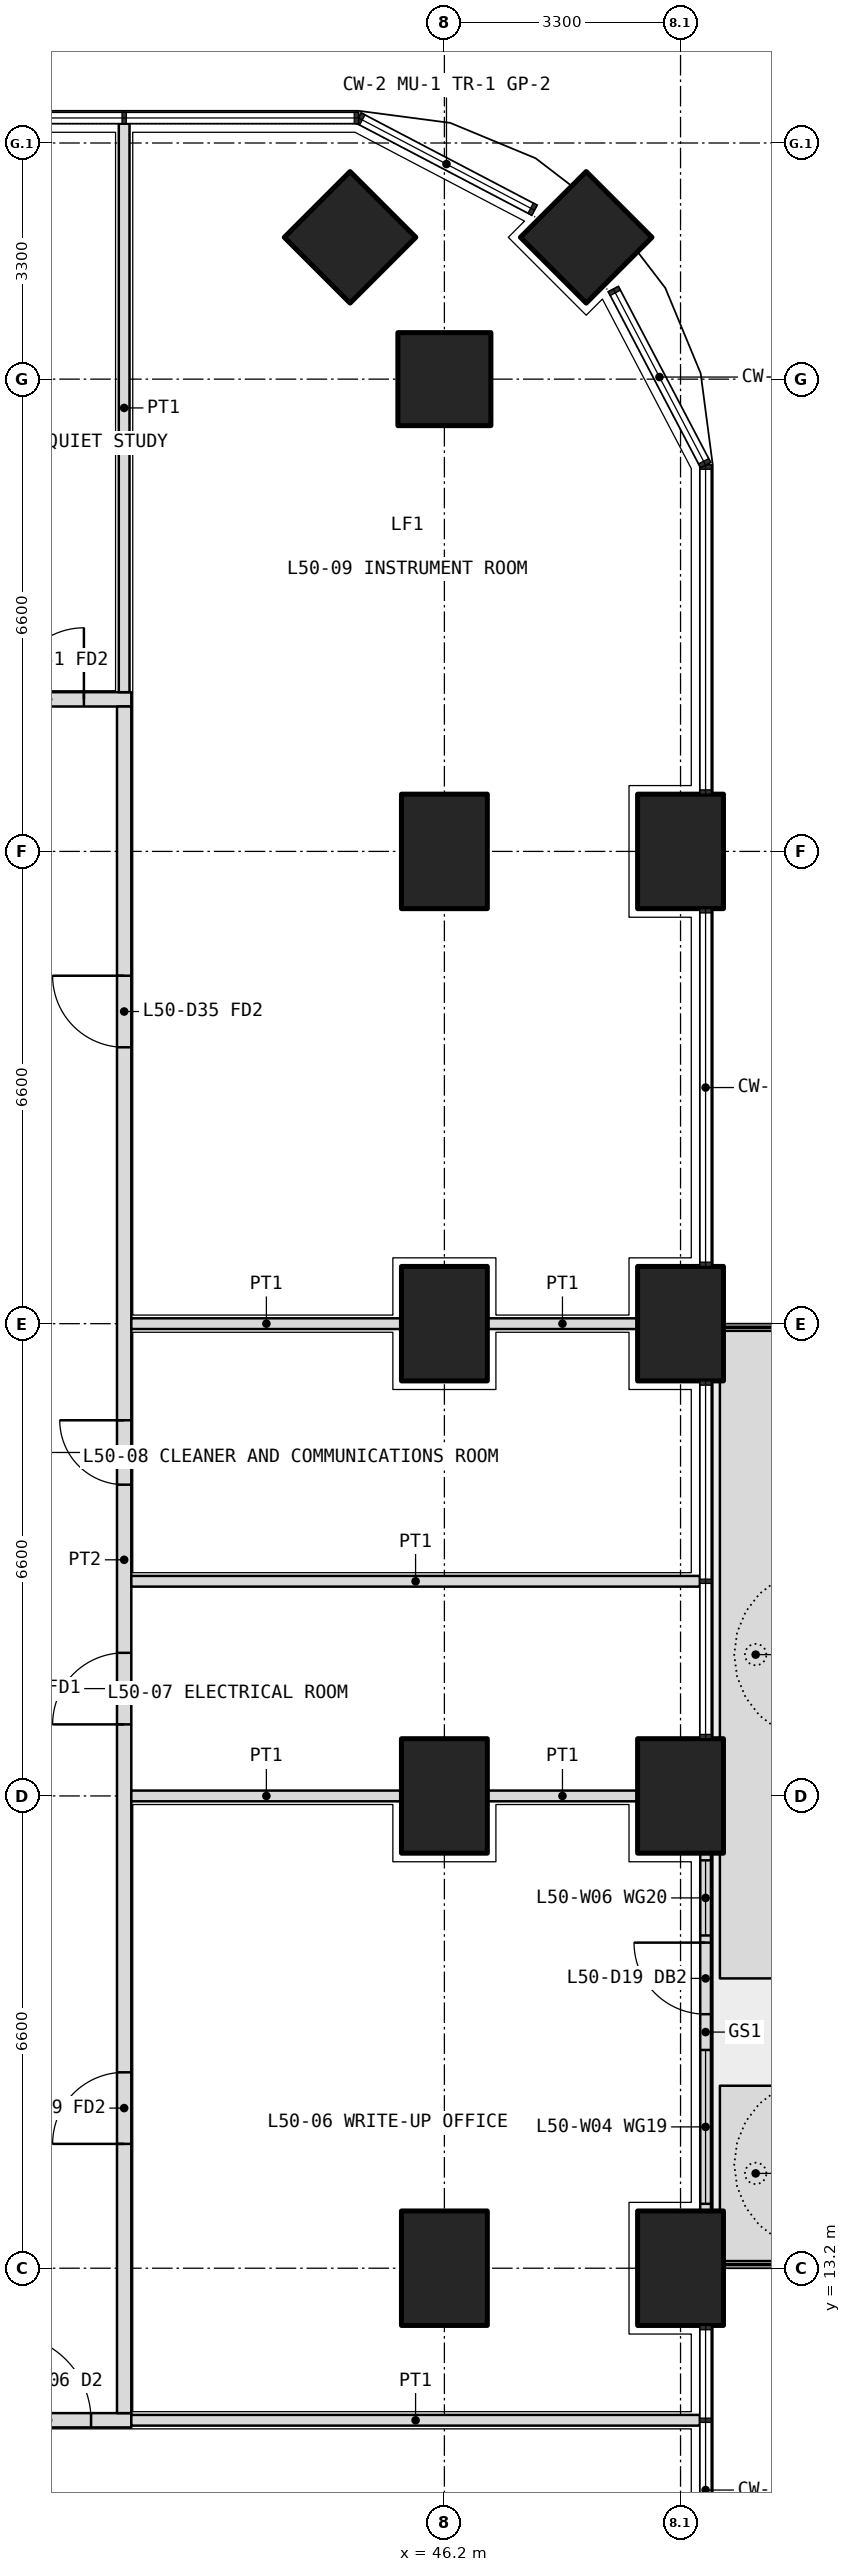
"""IFC4 building model, lengths in metres.
Left out: names, types, materials, properties, quantities, classifications, styles, units other than length and angle.
Written with IfcOpenShell. Run it as: python <this file> out.ifc"""

import sys

from ifc_helpers import new_model, si_unit, direction, frame, frame_2d, origin, origin_2d, place, context, subcontext, project, spatial, polyline, rectangle, outline, extrude, element, fill, save


model = new_model("IFC4")
c1 = context("Model", 3, precision=1e-05, world=origin(), true_north=direction((0.0, 1.0)))
c2 = subcontext(c1, "Body", "Model", "MODEL_VIEW")
j1 = project(units=[si_unit("LENGTHUNIT", "METRE"), si_unit("PLANEANGLEUNIT", "RADIAN")], contexts=[c1])
p1 = place(None, origin())
s1 = spatial("IfcSite", under=j1, at=p1, CompositionType="ELEMENT")
p2 = place(p1, origin())
s2 = spatial("IfcBuilding", under=s1, at=p2, CompositionType="ELEMENT")
p3 = place(p2, frame((0.0, 0.0, 218.7)))
s3 = spatial("IfcBuildingStorey", under=s2, at=p3, CompositionType="ELEMENT", Elevation=218.7)
p4 = place(p3, frame((48.182, 41.582, 0.0), z_axis=(0.0, 0.0, 1.0), x_axis=(0.707106781187, 0.707106781187, 0.0)))
e1 = element("IfcColumn", 1, at=p4, inside=s3, PredefinedType="COLUMN", context=c2, shape_type="SweptSolid", body=[
    extrude(rectangle(XDim=1.3, YDim=1.3, at=origin_2d()), origin(), (0.0, 0.0, 1.0), 4.2),
])
for number, where, z_axis, x_axis in (
    (2, (49.5, 13.2, 0.0), (0.0, 0.0, 1.0), (0.0, 1.0, 0.0)),
    (3, (49.5, 19.8, 0.0), (0.0, 0.0, 1.0), (0.0, 1.0, 0.0)),
    (4, (49.5, 26.4, 0.0), (0.0, 0.0, 1.0), (0.0, 1.0, 0.0)),
    (5, (49.5, 33.0, 0.0), (0.0, 0.0, 1.0), (0.0, 1.0, 0.0)),
):
    element("IfcColumn", number, at=place(p3, frame(where, z_axis=z_axis, x_axis=x_axis)), inside=s3, PredefinedType="COLUMN", context=c2, shape_type="SweptSolid", body=[
        extrude(rectangle(XDim=1.6, YDim=1.2, at=origin_2d()), origin(), (0.0, 0.0, 1.0), 4.2),
    ])
for number, where, z_axis, x_axis in (
    (6, (46.2, 39.6, 0.0), (0.0, 0.0, 1.0), (1.0, 0.0, 0.0)),
    (7, (44.882, 41.582, 0.0), (0.0, 0.0, 1.0), (0.707, 0.707, 0.0)),
):
    element("IfcColumn", number, at=place(p3, frame(where, z_axis=z_axis, x_axis=x_axis)), inside=s3, PredefinedType="COLUMN", context=c2, shape_type="SweptSolid", body=[
        extrude(rectangle(XDim=1.3, YDim=1.3, at=origin_2d()), origin(), (0.0, 0.0, 1.0), 4.2),
    ])
for number, where, z_axis, x_axis in (
    (8, (46.2, 13.2, 0.0), (0.0, 0.0, 1.0), (0.0, 1.0, 0.0)),
    (9, (46.2, 19.8, 0.0), (0.0, 0.0, 1.0), (0.0, 1.0, 0.0)),
    (10, (46.2, 26.4, 0.0), (0.0, 0.0, 1.0), (0.0, 1.0, 0.0)),
    (11, (46.2, 33.0, 0.0), (0.0, 0.0, 1.0), (0.0, 1.0, 0.0)),
):
    element("IfcColumn", number, at=place(p3, frame(where, z_axis=z_axis, x_axis=x_axis)), inside=s3, PredefinedType="COLUMN", context=c2, shape_type="SweptSolid", body=[
        extrude(rectangle(XDim=1.6, YDim=1.2, at=origin_2d()), origin(), (0.0, 0.0, 1.0), 4.2),
    ])
p5 = place(p3, origin())
e12 = element("IfcWall", 12, at=p5, inside=s3, PredefinedType="USERDEFINED", context=c2, shape_type="SweptSolid", body=[
    extrude(outline(polyline([(50.05, 13.3), (51.05, 13.3), (51.05, 15.75), (50.05, 15.75), (50.05, 13.3)]), holes=[polyline([(50.2, 13.45), (50.9, 13.45), (50.9, 15.6), (50.2, 15.6), (50.2, 13.45)])]), origin(), (0.0, 0.0, 1.0), 1.05),
])
p6 = place(p3, origin())
e13 = element("IfcWall", 13, at=p6, inside=s3, PredefinedType="USERDEFINED", context=c2, shape_type="SweptSolid", body=[
    extrude(outline(polyline([(50.05, 17.25), (51.05, 17.25), (51.05, 26.3), (50.05, 26.3), (50.05, 17.25)]), holes=[polyline([(50.2, 17.4), (50.9, 17.4), (50.9, 26.15), (50.2, 26.15), (50.2, 17.4)])]), origin(), (0.0, 0.0, 1.0), 1.05),
])
p7 = place(p3, frame((49.85, 14.0, 0.0), z_axis=(0.0, 0.0, 1.0), x_axis=(0.0, 1.0, 0.0)))
e14 = element("IfcWall", 14, at=p7, inside=s3, PredefinedType="SOLIDWALL", context=c2, shape_type="SweptSolid", body=[
    extrude(rectangle(XDim=5.0, YDim=0.15, at=frame_2d((2.5, 0.0))), origin(), (0.0, 0.0, 1.0), 2.05),
])
p8 = place(p7, frame((2.75, 0.0, 0.0)))
e15 = element("IfcOpeningElement", 15, at=p8, cuts=e14, PredefinedType="OPENING", context=c2, shape_type="SweptSolid", body=[
    extrude(rectangle(XDim=1.0, YDim=2.0, at=frame_2d((0.5, 1.0))), frame((0.0, 0.085, 0.0), z_axis=(0.0, -1.0, 0.0), x_axis=(1.0, 0.0, 0.0)), (0.0, 0.0, 1.0), 0.17),
])
p9 = place(p7, frame((0.1, 0.0, 0.1)))
e16 = element("IfcOpeningElement", 16, at=p9, cuts=e14, PredefinedType="OPENING", context=c2, shape_type="SweptSolid", body=[
    extrude(rectangle(XDim=2.15, YDim=1.65, at=frame_2d((1.075, 0.825))), frame((0.0, 0.085, 0.0), z_axis=(0.0, -1.0, 0.0), x_axis=(1.0, 0.0, 0.0)), (0.0, 0.0, 1.0), 0.17),
])
p10 = place(p7, frame((3.85, 0.0, 0.1)))
e17 = element("IfcOpeningElement", 17, at=p10, cuts=e14, PredefinedType="OPENING", context=c2, shape_type="SweptSolid", body=[
    extrude(rectangle(XDim=1.05, YDim=1.65, at=frame_2d((0.525, 0.825))), frame((0.0, 0.085, 0.0), z_axis=(0.0, -1.0, 0.0), x_axis=(1.0, 0.0, 0.0)), (0.0, 0.0, 1.0), 0.17),
])
p11 = place(p3, frame((26.4, 11.075, 0.0), z_axis=(0.0, 0.0, 1.0), x_axis=(1.0, 0.0, 0.0)))
e18 = element("IfcWall", 18, at=p11, inside=s3, PredefinedType="PARTITIONING", context=c2, shape_type="SweptSolid", body=[
    extrude(rectangle(XDim=15.425, YDim=0.2, at=frame_2d((7.712, 0.0))), origin(), (0.0, 0.0, 1.0), 2.55),
])
p12 = place(p11, frame((6.1, 0.0, 0.0)))
e19 = element("IfcOpeningElement", 19, at=p12, cuts=e18, PredefinedType="OPENING", context=c2, shape_type="SweptSolid", body=[
    extrude(rectangle(XDim=1.0, YDim=2.1, at=frame_2d((0.5, 1.05))), frame((0.0, 0.11, 0.0), z_axis=(0.0, -1.0, 0.0), x_axis=(1.0, 0.0, 0.0)), (0.0, 0.0, 1.0), 0.22),
])
p13 = place(p11, frame((13.663, 0.0, 0.0)))
e20 = element("IfcOpeningElement", 20, at=p13, cuts=e18, PredefinedType="OPENING", context=c2, shape_type="SweptSolid", body=[
    extrude(rectangle(XDim=1.2, YDim=2.1, at=frame_2d((0.6, 1.05))), frame((0.0, 0.11, 0.0), z_axis=(0.0, -1.0, 0.0), x_axis=(1.0, 0.0, 0.0)), (0.0, 0.0, 1.0), 0.22),
])
p14 = place(p3, frame((10.975, 35.125, 0.0), z_axis=(0.0, 0.0, 1.0), x_axis=(1.0, 0.0, 0.0)))
e21 = element("IfcWall", 21, at=p14, inside=s3, PredefinedType="PARTITIONING", context=c2, shape_type="SweptSolid", body=[
    extrude(rectangle(XDim=30.85, YDim=0.2, at=frame_2d((15.425, 0.0))), origin(), (0.0, 0.0, 1.0), 2.55),
])
p15 = place(p14, frame((3.863, 0.0, 0.0)))
e22 = element("IfcOpeningElement", 22, at=p15, cuts=e21, PredefinedType="OPENING", context=c2, shape_type="SweptSolid", body=[
    extrude(rectangle(XDim=1.2, YDim=2.1, at=frame_2d((0.6, 1.05))), frame((0.0, 0.11, 0.0), z_axis=(0.0, -1.0, 0.0), x_axis=(1.0, 0.0, 0.0)), (0.0, 0.0, 1.0), 0.22),
])
p16 = place(p14, frame((11.625, 0.0, 0.0)))
e23 = element("IfcOpeningElement", 23, at=p16, cuts=e21, PredefinedType="OPENING", context=c2, shape_type="SweptSolid", body=[
    extrude(rectangle(XDim=1.0, YDim=2.1, at=frame_2d((0.5, 1.05))), frame((0.0, 0.11, 0.0), z_axis=(0.0, -1.0, 0.0), x_axis=(1.0, 0.0, 0.0)), (0.0, 0.0, 1.0), 0.22),
])
p17 = place(p14, frame((18.125, 0.0, 0.0)))
e24 = element("IfcOpeningElement", 24, at=p17, cuts=e21, PredefinedType="OPENING", context=c2, shape_type="SweptSolid", body=[
    extrude(rectangle(XDim=1.2, YDim=2.1, at=frame_2d((0.6, 1.05))), frame((0.0, 0.11, 0.0), z_axis=(0.0, -1.0, 0.0), x_axis=(1.0, 0.0, 0.0)), (0.0, 0.0, 1.0), 0.22),
])
p18 = place(p14, frame((23.625, 0.0, 0.0)))
e25 = element("IfcOpeningElement", 25, at=p18, cuts=e21, PredefinedType="OPENING", context=c2, shape_type="SweptSolid", body=[
    extrude(rectangle(XDim=1.0, YDim=2.1, at=frame_2d((0.5, 1.05))), frame((0.0, 0.11, 0.0), z_axis=(0.0, -1.0, 0.0), x_axis=(1.0, 0.0, 0.0)), (0.0, 0.0, 1.0), 0.22),
])
p19 = place(p14, frame((26.925, 0.0, 0.0)))
e26 = element("IfcOpeningElement", 26, at=p19, cuts=e21, PredefinedType="OPENING", context=c2, shape_type="SweptSolid", body=[
    extrude(rectangle(XDim=1.0, YDim=2.1, at=frame_2d((0.5, 1.05))), frame((0.0, 0.11, 0.0), z_axis=(0.0, -1.0, 0.0), x_axis=(1.0, 0.0, 0.0)), (0.0, 0.0, 1.0), 0.22),
])
p20 = place(p14, frame((29.188, 0.0, 0.0)))
e27 = element("IfcOpeningElement", 27, at=p20, cuts=e21, PredefinedType="OPENING", context=c2, shape_type="SweptSolid", body=[
    extrude(rectangle(XDim=1.0, YDim=2.1, at=frame_2d((0.5, 1.05))), frame((0.0, 0.11, 0.0), z_axis=(0.0, -1.0, 0.0), x_axis=(1.0, 0.0, 0.0)), (0.0, 0.0, 1.0), 0.22),
])
p21 = place(p3, frame((41.725, 11.175, 0.0), z_axis=(0.0, 0.0, 1.0), x_axis=(0.0, 1.0, 0.0)))
e28 = element("IfcWall", 28, at=p21, inside=s3, PredefinedType="PARTITIONING", context=c2, shape_type="SweptSolid", body=[
    extrude(rectangle(XDim=23.85, YDim=0.2, at=frame_2d((11.925, 0.0))), origin(), (0.0, 0.0, 1.0), 2.55),
])
p22 = place(p21, frame((3.762, 0.0, 0.0)))
e29 = element("IfcOpeningElement", 29, at=p22, cuts=e28, PredefinedType="OPENING", context=c2, shape_type="SweptSolid", body=[
    extrude(rectangle(XDim=1.0, YDim=2.1, at=frame_2d((0.5, 1.05))), frame((0.0, 0.11, 0.0), z_axis=(0.0, -1.0, 0.0), x_axis=(1.0, 0.0, 0.0)), (0.0, 0.0, 1.0), 0.22),
])
p23 = place(p21, frame((9.625, 0.0, 0.0)))
e30 = element("IfcOpeningElement", 30, at=p23, cuts=e28, PredefinedType="OPENING", context=c2, shape_type="SweptSolid", body=[
    extrude(rectangle(XDim=1.0, YDim=2.1, at=frame_2d((0.5, 1.05))), frame((0.0, 0.11, 0.0), z_axis=(0.0, -1.0, 0.0), x_axis=(1.0, 0.0, 0.0)), (0.0, 0.0, 1.0), 0.22),
])
p24 = place(p21, frame((12.975, 0.0, 0.0)))
e31 = element("IfcOpeningElement", 31, at=p24, cuts=e28, PredefinedType="OPENING", context=c2, shape_type="SweptSolid", body=[
    extrude(rectangle(XDim=0.9, YDim=2.1, at=frame_2d((0.45, 1.05))), frame((0.0, 0.11, 0.0), z_axis=(0.0, -1.0, 0.0), x_axis=(1.0, 0.0, 0.0)), (0.0, 0.0, 1.0), 0.22),
])
p25 = place(p21, frame((19.087, 0.0, 0.0)))
e32 = element("IfcOpeningElement", 32, at=p25, cuts=e28, PredefinedType="OPENING", context=c2, shape_type="SweptSolid", body=[
    extrude(rectangle(XDim=1.0, YDim=2.1, at=frame_2d((0.5, 1.05))), frame((0.0, 0.11, 0.0), z_axis=(0.0, -1.0, 0.0), x_axis=(1.0, 0.0, 0.0)), (0.0, 0.0, 1.0), 0.22),
])
p26 = place(p3, frame((49.77, 11.075, 0.0), z_axis=(0.0, 0.0, 1.0), x_axis=(-1.0, 0.0, 0.0)))
e33 = element("IfcWall", 33, at=p26, inside=s3, PredefinedType="PARTITIONING", context=c2, shape_type="SweptSolid", body=[
    extrude(rectangle(XDim=7.945, YDim=0.15, at=frame_2d((3.973, 0.0))), origin(), (0.0, 0.0, 1.0), 3.85),
])
p27 = place(p3, frame((41.725, 43.17, 0.0), z_axis=(0.0, 0.0, 1.0), x_axis=(0.0, -1.0, 0.0)))
e34 = element("IfcWall", 34, at=p27, inside=s3, PredefinedType="PARTITIONING", context=c2, shape_type="SweptSolid", body=[
    extrude(rectangle(XDim=7.945, YDim=0.15, at=frame_2d((3.972, 0.0))), origin(), (0.0, 0.0, 1.0), 3.85),
])
p28 = place(p3, frame((49.77, 22.8, 0.0), z_axis=(0.0, 0.0, 1.0), x_axis=(-1.0, 0.0, 0.0)))
e35 = element("IfcWall", 35, at=p28, inside=s3, PredefinedType="PARTITIONING", context=c2, shape_type="SweptSolid", body=[
    extrude(rectangle(XDim=7.945, YDim=0.15, at=frame_2d((3.973, 0.0))), origin(), (0.0, 0.0, 1.0), 3.85),
])
p29 = place(p3, frame((48.9, 26.4, 0.0), z_axis=(0.0, 0.0, 1.0), x_axis=(-1.0, 0.0, 0.0)))
e36 = element("IfcWall", 36, at=p29, inside=s3, PredefinedType="PARTITIONING", context=c2, shape_type="SweptSolid", body=[
    extrude(rectangle(XDim=2.1, YDim=0.15, at=frame_2d((1.05, 0.0))), origin(), (0.0, 0.0, 1.0), 2.55),
])
p30 = place(p3, frame((45.6, 26.4, 0.0), z_axis=(0.0, 0.0, 1.0), x_axis=(-1.0, 0.0, 0.0)))
e37 = element("IfcWall", 37, at=p30, inside=s3, PredefinedType="PARTITIONING", context=c2, shape_type="SweptSolid", body=[
    extrude(rectangle(XDim=3.775, YDim=0.15, at=frame_2d((1.888, 0.0))), origin(), (0.0, 0.0, 1.0), 2.55),
])
p31 = place(p3, frame((48.9, 19.8, 0.0), z_axis=(0.0, 0.0, 1.0), x_axis=(-1.0, 0.0, 0.0)))
e38 = element("IfcWall", 38, at=p31, inside=s3, PredefinedType="PARTITIONING", context=c2, shape_type="SweptSolid", body=[
    extrude(rectangle(XDim=2.1, YDim=0.15, at=frame_2d((1.05, 0.0))), origin(), (0.0, 0.0, 1.0), 2.55),
])
p32 = place(p3, frame((45.6, 19.8, 0.0), z_axis=(0.0, 0.0, 1.0), x_axis=(-1.0, 0.0, 0.0)))
e39 = element("IfcWall", 39, at=p32, inside=s3, PredefinedType="PARTITIONING", context=c2, shape_type="SweptSolid", body=[
    extrude(rectangle(XDim=3.775, YDim=0.15, at=frame_2d((1.888, 0.0))), origin(), (0.0, 0.0, 1.0), 2.55),
])
p33 = place(p8, origin())
e40 = element("IfcDoor", 40, at=p33, inside=s3, OperationType="SINGLE_SWING_RIGHT", PredefinedType="DOOR", context=c2, shape_type="SweptSolid", body=[
    extrude(rectangle(XDim=1.0, YDim=2.0, at=frame_2d((0.5, 1.0))), frame((0.0, 0.025, 0.0), z_axis=(0.0, -1.0, 0.0), x_axis=(1.0, 0.0, 0.0)), (0.0, 0.0, 1.0), 0.05),
])
fill(e15, e40)
p34 = place(p9, origin())
e41 = element("IfcWindow", 41, at=p34, inside=s3, PartitioningType="SINGLE_PANEL", PredefinedType="WINDOW", context=c2, shape_type="SweptSolid", body=[
    extrude(rectangle(XDim=2.15, YDim=1.65, at=frame_2d((1.075, 0.825))), frame((0.0, 0.03, 0.0), z_axis=(0.0, -1.0, 0.0), x_axis=(1.0, 0.0, 0.0)), (0.0, 0.0, 1.0), 0.06),
])
fill(e16, e41)
p35 = place(p10, origin())
e42 = element("IfcWindow", 42, at=p35, inside=s3, PartitioningType="SINGLE_PANEL", PredefinedType="WINDOW", context=c2, shape_type="SweptSolid", body=[
    extrude(rectangle(XDim=1.05, YDim=1.65, at=frame_2d((0.525, 0.825))), frame((0.0, 0.03, 0.0), z_axis=(0.0, -1.0, 0.0), x_axis=(1.0, 0.0, 0.0)), (0.0, 0.0, 1.0), 0.06),
])
fill(e17, e42)
p36 = place(p13, origin())
e43 = element("IfcDoor", 43, at=p36, inside=s3, OperationType="DOUBLE_DOOR_SINGLE_SWING", PredefinedType="DOOR", context=c2, shape_type="SweptSolid", body=[
    extrude(rectangle(XDim=1.2, YDim=2.1, at=frame_2d((0.6, 1.05))), frame((0.0, 0.025, 0.0), z_axis=(0.0, -1.0, 0.0), x_axis=(1.0, 0.0, 0.0)), (0.0, 0.0, 1.0), 0.05),
])
fill(e20, e43)
p37 = place(p22, origin())
e44 = element("IfcDoor", 44, at=p37, inside=s3, OperationType="SINGLE_SWING_LEFT", PredefinedType="DOOR", context=c2, shape_type="SweptSolid", body=[
    extrude(rectangle(XDim=1.0, YDim=2.1, at=frame_2d((0.5, 1.05))), frame((0.0, 0.025, 0.0), z_axis=(0.0, -1.0, 0.0), x_axis=(1.0, 0.0, 0.0)), (0.0, 0.0, 1.0), 0.05),
])
fill(e29, e44)
p38 = place(p23, origin())
e45 = element("IfcDoor", 45, at=p38, inside=s3, OperationType="SINGLE_SWING_LEFT", PredefinedType="DOOR", context=c2, shape_type="SweptSolid", body=[
    extrude(rectangle(XDim=1.0, YDim=2.1, at=frame_2d((0.5, 1.05))), frame((0.0, 0.025, 0.0), z_axis=(0.0, -1.0, 0.0), x_axis=(1.0, 0.0, 0.0)), (0.0, 0.0, 1.0), 0.05),
])
fill(e30, e45)
p39 = place(p24, origin())
e46 = element("IfcDoor", 46, at=p39, inside=s3, OperationType="SINGLE_SWING_RIGHT", PredefinedType="DOOR", context=c2, shape_type="SweptSolid", body=[
    extrude(rectangle(XDim=0.9, YDim=2.1, at=frame_2d((0.45, 1.05))), frame((0.0, 0.025, 0.0), z_axis=(0.0, -1.0, 0.0), x_axis=(1.0, 0.0, 0.0)), (0.0, 0.0, 1.0), 0.05),
])
fill(e31, e46)
p40 = place(p25, origin())
e47 = element("IfcDoor", 47, at=p40, inside=s3, OperationType="SINGLE_SWING_RIGHT", PredefinedType="DOOR", context=c2, shape_type="SweptSolid", body=[
    extrude(rectangle(XDim=1.0, YDim=2.1, at=frame_2d((0.5, 1.05))), frame((0.0, 0.025, 0.0), z_axis=(0.0, -1.0, 0.0), x_axis=(1.0, 0.0, 0.0)), (0.0, 0.0, 1.0), 0.05),
])
fill(e32, e47)
p41 = place(p20, origin())
e48 = element("IfcDoor", 48, at=p41, inside=s3, OperationType="SINGLE_SWING_RIGHT", PredefinedType="DOOR", context=c2, shape_type="SweptSolid", body=[
    extrude(rectangle(XDim=1.0, YDim=2.1, at=frame_2d((0.5, 1.05))), frame((0.0, 0.025, 0.0), z_axis=(0.0, -1.0, 0.0), x_axis=(1.0, 0.0, 0.0)), (0.0, 0.0, 1.0), 0.05),
])
fill(e27, e48)
save(model, sys.argv[1])
